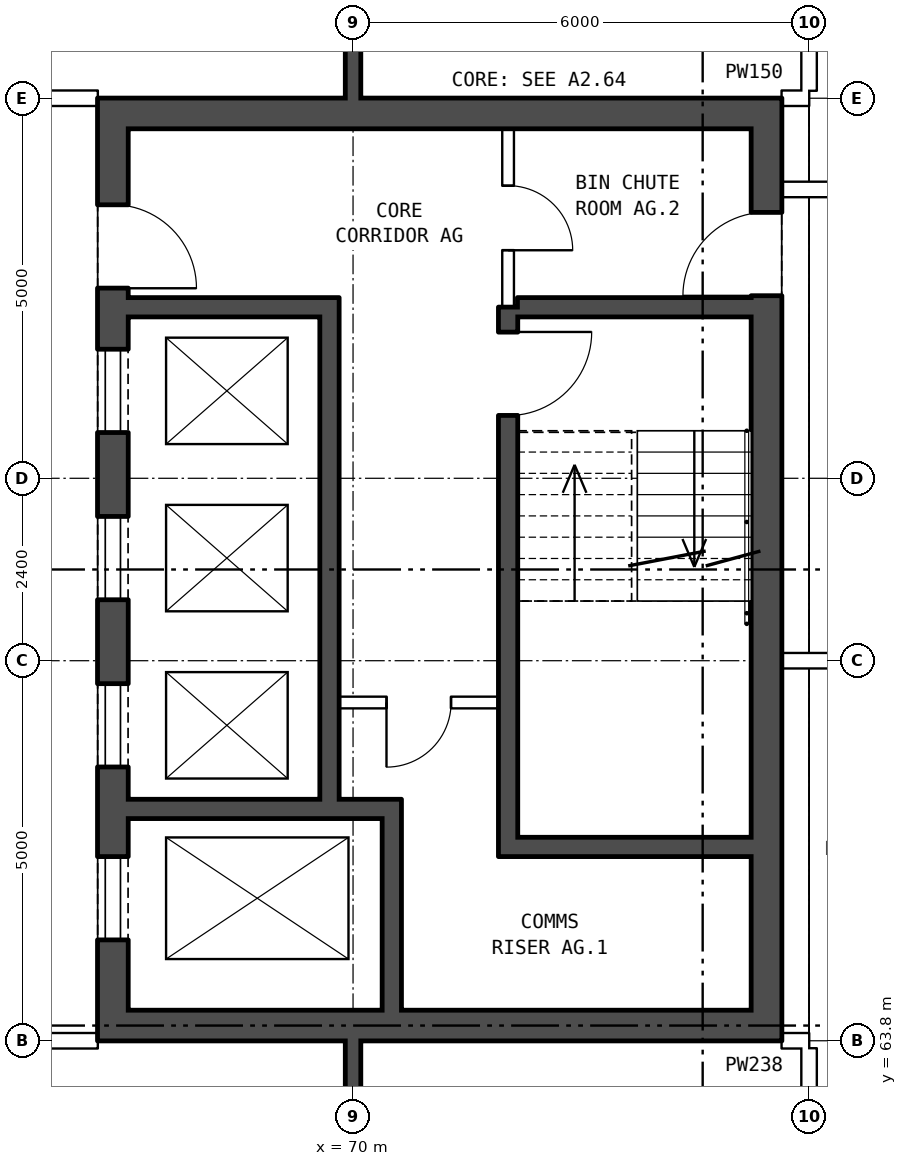
"""IFC4 building model, lengths in metres.
Left out: names, types, materials, properties, quantities, classifications, styles, units other than length and angle.
Written with IfcOpenShell. Run it as: python <this file> out.ifc"""

import sys

from ifc_helpers import new_model, si_unit, direction, frame, frame_2d, origin, place, context, subcontext, project, spatial, rectangle, extrude, element, fill, save


model = new_model("IFC4")
c1 = context("Model", 3, precision=1e-05, world=origin(), true_north=direction((0.0, 1.0)))
c2 = subcontext(c1, "Body", "Model", "MODEL_VIEW")
j1 = project(units=[si_unit("LENGTHUNIT", "METRE"), si_unit("PLANEANGLEUNIT", "RADIAN")], contexts=[c1])
p1 = place(None, origin())
s1 = spatial("IfcSite", under=j1, at=p1, CompositionType="ELEMENT")
p2 = place(p1, origin())
s2 = spatial("IfcBuilding", under=s1, at=p2, CompositionType="ELEMENT")
p3 = place(p2, frame((0.0, 0.0, 224.5)))
s3 = spatial("IfcBuildingStorey", under=s2, at=p3, CompositionType="ELEMENT", Elevation=224.5)
p4 = place(p3, frame((66.84, 63.8, 0.0), z_axis=(0.0, 0.0, 1.0), x_axis=(0.0, 1.0, 0.0)))
e1 = element("IfcWall", 1, at=p4, inside=s3, PredefinedType="SHEAR", context=c2, shape_type="SweptSolid", body=[
    extrude(rectangle(XDim=12.4, YDim=0.4, at=frame_2d((6.2, 0.0))), origin(), (0.0, 0.0, 1.0), 2.85),
])
p5 = place(p4, frame((1.325, 0.0, 0.0)))
e2 = element("IfcOpeningElement", 2, at=p5, cuts=e1, PredefinedType="OPENING", context=c2, shape_type="SweptSolid", body=[
    extrude(rectangle(XDim=1.1, YDim=2.1, at=frame_2d((0.55, 1.05))), frame((0.0, 0.21, 0.0), z_axis=(0.0, -1.0, 0.0), x_axis=(1.0, 0.0, 0.0)), (0.0, 0.0, 1.0), 0.42),
])
p6 = place(p4, frame((3.6, 0.0, 0.0)))
e3 = element("IfcOpeningElement", 3, at=p6, cuts=e1, PredefinedType="OPENING", context=c2, shape_type="SweptSolid", body=[
    extrude(rectangle(XDim=1.1, YDim=2.1, at=frame_2d((0.55, 1.05))), frame((0.0, 0.21, 0.0), z_axis=(0.0, -1.0, 0.0), x_axis=(1.0, 0.0, 0.0)), (0.0, 0.0, 1.0), 0.42),
])
p7 = place(p4, frame((5.8, 0.0, 0.0)))
e4 = element("IfcOpeningElement", 4, at=p7, cuts=e1, PredefinedType="OPENING", context=c2, shape_type="SweptSolid", body=[
    extrude(rectangle(XDim=1.1, YDim=2.1, at=frame_2d((0.55, 1.05))), frame((0.0, 0.21, 0.0), z_axis=(0.0, -1.0, 0.0), x_axis=(1.0, 0.0, 0.0)), (0.0, 0.0, 1.0), 0.42),
])
p8 = place(p4, frame((8.0, 0.0, 0.0)))
e5 = element("IfcOpeningElement", 5, at=p8, cuts=e1, PredefinedType="OPENING", context=c2, shape_type="SweptSolid", body=[
    extrude(rectangle(XDim=1.1, YDim=2.1, at=frame_2d((0.55, 1.05))), frame((0.0, 0.21, 0.0), z_axis=(0.0, -1.0, 0.0), x_axis=(1.0, 0.0, 0.0)), (0.0, 0.0, 1.0), 0.42),
])
p9 = place(p4, frame((9.9, 0.0, 0.0)))
e6 = element("IfcOpeningElement", 6, at=p9, cuts=e1, PredefinedType="OPENING", context=c2, shape_type="SweptSolid", body=[
    extrude(rectangle(XDim=1.1, YDim=2.1, at=frame_2d((0.55, 1.05))), frame((0.0, 0.21, 0.0), z_axis=(0.0, -1.0, 0.0), x_axis=(1.0, 0.0, 0.0)), (0.0, 0.0, 1.0), 0.42),
])
p10 = place(p3, frame((75.44, 63.8, 0.0), z_axis=(0.0, 0.0, 1.0), x_axis=(0.0, 1.0, 0.0)))
e7 = element("IfcWall", 7, at=p10, inside=s3, PredefinedType="SHEAR", context=c2, shape_type="SweptSolid", body=[
    extrude(rectangle(XDim=12.4, YDim=0.4, at=frame_2d((6.2, 0.0))), origin(), (0.0, 0.0, 1.0), 2.85),
])
p11 = place(p10, frame((9.8, 0.0, 0.0)))
e8 = element("IfcOpeningElement", 8, at=p11, cuts=e7, PredefinedType="OPENING", context=c2, shape_type="SweptSolid", body=[
    extrude(rectangle(XDim=1.1, YDim=2.1, at=frame_2d((0.55, 1.05))), frame((0.0, 0.21, 0.0), z_axis=(0.0, -1.0, 0.0), x_axis=(1.0, 0.0, 0.0)), (0.0, 0.0, 1.0), 0.42),
])
for number, where, z_axis, x_axis in (
    (9, (67.04, 64.0, 0.0), (0.0, 0.0, 1.0), (1.0, 0.0, 0.0)),
    (10, (67.04, 76.0, 0.0), (0.0, 0.0, 1.0), (1.0, 0.0, 0.0)),
):
    element("IfcWall", number, at=place(p3, frame(where, z_axis=z_axis, x_axis=x_axis)), inside=s3, PredefinedType="SHEAR", context=c2, shape_type="SweptSolid", body=[
        extrude(rectangle(XDim=8.2, YDim=0.4, at=frame_2d((4.1, 0.0))), origin(), (0.0, 0.0, 1.0), 2.85),
    ])
p12 = place(p3, frame((72.165, 66.35, 0.0), z_axis=(0.0, 0.0, 1.0), x_axis=(1.0, 0.0, 0.0)))
e11 = element("IfcWall", 11, at=p12, inside=s3, PredefinedType="SHEAR", context=c2, shape_type="SweptSolid", body=[
    extrude(rectangle(XDim=3.075, YDim=0.25, at=frame_2d((1.538, 0.0))), origin(), (0.0, 0.0, 1.0), 2.85),
])
p13 = place(p3, frame((67.04, 66.85, 0.0), z_axis=(0.0, 0.0, 1.0), x_axis=(1.0, 0.0, 0.0)))
e12 = element("IfcWall", 12, at=p13, inside=s3, PredefinedType="SHEAR", context=c2, shape_type="SweptSolid", body=[
    extrude(rectangle(XDim=3.595, YDim=0.25, at=frame_2d((1.797, 0.0))), origin(), (0.0, 0.0, 1.0), 2.85),
])
p14 = place(p3, frame((69.815, 68.25, 0.0), z_axis=(0.0, 0.0, 1.0), x_axis=(1.0, 0.0, 0.0)))
e13 = element("IfcWall", 13, at=p14, inside=s3, PredefinedType="PARTITIONING", context=c2, shape_type="SweptSolid", body=[
    extrude(rectangle(XDim=2.1, YDim=0.15, at=frame_2d((1.05, 0.0))), origin(), (0.0, 0.0, 1.0), 2.85),
])
p15 = place(p14, frame((0.625, 0.0, 0.0)))
e14 = element("IfcOpeningElement", 14, at=p15, cuts=e13, PredefinedType="OPENING", context=c2, shape_type="SweptSolid", body=[
    extrude(rectangle(XDim=0.85, YDim=2.1, at=frame_2d((0.425, 1.05))), frame((0.0, 0.085, 0.0), z_axis=(0.0, -1.0, 0.0), x_axis=(1.0, 0.0, 0.0)), (0.0, 0.0, 1.0), 0.17),
])
p16 = place(p3, frame((67.04, 73.45, 0.0), z_axis=(0.0, 0.0, 1.0), x_axis=(1.0, 0.0, 0.0)))
e15 = element("IfcWall", 15, at=p16, inside=s3, PredefinedType="SHEAR", context=c2, shape_type="SweptSolid", body=[
    extrude(rectangle(XDim=2.525, YDim=0.25, at=frame_2d((1.262, 0.0))), origin(), (0.0, 0.0, 1.0), 2.85),
])
p17 = place(p3, frame((72.165, 73.45, 0.0), z_axis=(0.0, 0.0, 1.0), x_axis=(1.0, 0.0, 0.0)))
e16 = element("IfcWall", 16, at=p17, inside=s3, PredefinedType="SHEAR", context=c2, shape_type="SweptSolid", body=[
    extrude(rectangle(XDim=3.075, YDim=0.25, at=frame_2d((1.538, 0.0))), origin(), (0.0, 0.0, 1.0), 2.85),
])
p18 = place(p3, frame((69.69, 66.975, 0.0), z_axis=(0.0, 0.0, 1.0), x_axis=(0.0, 1.0, 0.0)))
e17 = element("IfcWall", 17, at=p18, inside=s3, PredefinedType="SHEAR", context=c2, shape_type="SweptSolid", body=[
    extrude(rectangle(XDim=6.6, YDim=0.25, at=frame_2d((3.3, 0.0))), origin(), (0.0, 0.0, 1.0), 2.85),
])
p19 = place(p3, frame((70.51, 64.2, 0.0), z_axis=(0.0, 0.0, 1.0), x_axis=(0.0, 1.0, 0.0)))
e18 = element("IfcWall", 18, at=p19, inside=s3, PredefinedType="SHEAR", context=c2, shape_type="SweptSolid", body=[
    extrude(rectangle(XDim=2.525, YDim=0.25, at=frame_2d((1.263, 0.0))), origin(), (0.0, 0.0, 1.0), 2.85),
])
p20 = place(p3, frame((72.04, 66.225, 0.0), z_axis=(0.0, 0.0, 1.0), x_axis=(0.0, 1.0, 0.0)))
e19 = element("IfcWall", 19, at=p20, inside=s3, PredefinedType="SHEAR", context=c2, shape_type="SweptSolid", body=[
    extrude(rectangle(XDim=7.225, YDim=0.25, at=frame_2d((3.612, 0.0))), origin(), (0.0, 0.0, 1.0), 2.85),
])
p21 = place(p20, frame((5.8, 0.0, 0.0)))
e20 = element("IfcOpeningElement", 20, at=p21, cuts=e19, PredefinedType="OPENING", context=c2, shape_type="SweptSolid", body=[
    extrude(rectangle(XDim=1.1, YDim=2.1, at=frame_2d((0.55, 1.05))), frame((0.0, 0.135, 0.0), z_axis=(0.0, -1.0, 0.0), x_axis=(1.0, 0.0, 0.0)), (0.0, 0.0, 1.0), 0.27),
])
p22 = place(p3, frame((72.04, 73.45, 0.0), z_axis=(0.0, 0.0, 1.0), x_axis=(0.0, 1.0, 0.0)))
e21 = element("IfcWall", 21, at=p22, inside=s3, PredefinedType="PARTITIONING", context=c2, shape_type="SweptSolid", body=[
    extrude(rectangle(XDim=2.35, YDim=0.15, at=frame_2d((1.175, 0.0))), origin(), (0.0, 0.0, 1.0), 2.85),
])
p23 = place(p22, frame((0.75, 0.0, 0.0)))
e22 = element("IfcOpeningElement", 22, at=p23, cuts=e21, PredefinedType="OPENING", context=c2, shape_type="SweptSolid", body=[
    extrude(rectangle(XDim=0.85, YDim=2.1, at=frame_2d((0.425, 1.05))), frame((0.0, 0.085, 0.0), z_axis=(0.0, -1.0, 0.0), x_axis=(1.0, 0.0, 0.0)), (0.0, 0.0, 1.0), 0.17),
])
p24 = place(p3, frame((63.64, 63.8, 0.0), z_axis=(0.0, 0.0, 1.0), x_axis=(1.0, 0.0, 0.0)))
e23 = element("IfcWall", 23, at=p24, inside=s3, PredefinedType="PARTITIONING", context=c2, shape_type="SweptSolid", body=[
    extrude(rectangle(XDim=3.0, YDim=0.2, at=frame_2d((1.5, 0.0))), origin(), (0.0, 0.0, 1.0), 2.85),
])
p25 = place(p24, frame((1.18, 0.0, 0.0)))
e24 = element("IfcOpeningElement", 24, at=p25, cuts=e23, PredefinedType="OPENING", context=c2, shape_type="SweptSolid", body=[
    extrude(rectangle(XDim=1.0, YDim=2.1, at=frame_2d((0.5, 1.05))), frame((0.0, 0.11, 0.0), z_axis=(0.0, -1.0, 0.0), x_axis=(1.0, 0.0, 0.0)), (0.0, 0.0, 1.0), 0.22),
])
p26 = place(p3, frame((75.64, 63.8, 0.0), z_axis=(0.0, 0.0, 1.0), x_axis=(1.0, 0.0, 0.0)))
e25 = element("IfcWall", 25, at=p26, inside=s3, PredefinedType="PARTITIONING", context=c2, shape_type="SweptSolid", body=[
    extrude(rectangle(XDim=0.36, YDim=0.2, at=frame_2d((0.18, 0.0))), origin(), (0.0, 0.0, 1.0), 2.85),
])
p27 = place(p3, frame((75.64, 68.8, 0.0), z_axis=(0.0, 0.0, 1.0), x_axis=(1.0, 0.0, 0.0)))
e26 = element("IfcWall", 26, at=p27, inside=s3, PredefinedType="PARTITIONING", context=c2, shape_type="SweptSolid", body=[
    extrude(rectangle(XDim=55.72, YDim=0.2, at=frame_2d((27.86, 0.0))), origin(), (0.0, 0.0, 1.0), 2.85),
])
p28 = place(p27, frame((1.399, 0.0, 0.0)))
e27 = element("IfcOpeningElement", 27, at=p28, cuts=e26, PredefinedType="OPENING", context=c2, shape_type="SweptSolid", body=[
    extrude(rectangle(XDim=1.0, YDim=2.1, at=frame_2d((0.5, 1.05))), frame((0.0, 0.11, 0.0), z_axis=(0.0, -1.0, 0.0), x_axis=(1.0, 0.0, 0.0)), (0.0, 0.0, 1.0), 0.22),
])
p29 = place(p27, frame((12.241, 0.0, 0.0)))
e28 = element("IfcOpeningElement", 28, at=p29, cuts=e26, PredefinedType="OPENING", context=c2, shape_type="SweptSolid", body=[
    extrude(rectangle(XDim=1.0, YDim=2.1, at=frame_2d((0.5, 1.05))), frame((0.0, 0.11, 0.0), z_axis=(0.0, -1.0, 0.0), x_axis=(1.0, 0.0, 0.0)), (0.0, 0.0, 1.0), 0.22),
])
p30 = place(p27, frame((22.553, 0.0, 0.0)))
e29 = element("IfcOpeningElement", 29, at=p30, cuts=e26, PredefinedType="OPENING", context=c2, shape_type="SweptSolid", body=[
    extrude(rectangle(XDim=1.0, YDim=2.1, at=frame_2d((0.5, 1.05))), frame((0.0, 0.11, 0.0), z_axis=(0.0, -1.0, 0.0), x_axis=(1.0, 0.0, 0.0)), (0.0, 0.0, 1.0), 0.22),
])
p31 = place(p27, frame((32.866, 0.0, 0.0)))
e30 = element("IfcOpeningElement", 30, at=p31, cuts=e26, PredefinedType="OPENING", context=c2, shape_type="SweptSolid", body=[
    extrude(rectangle(XDim=1.0, YDim=2.1, at=frame_2d((0.5, 1.05))), frame((0.0, 0.11, 0.0), z_axis=(0.0, -1.0, 0.0), x_axis=(1.0, 0.0, 0.0)), (0.0, 0.0, 1.0), 0.22),
])
p32 = place(p27, frame((36.303, 0.0, 0.0)))
e31 = element("IfcOpeningElement", 31, at=p32, cuts=e26, PredefinedType="OPENING", context=c2, shape_type="SweptSolid", body=[
    extrude(rectangle(XDim=1.0, YDim=2.1, at=frame_2d((0.5, 1.05))), frame((0.0, 0.11, 0.0), z_axis=(0.0, -1.0, 0.0), x_axis=(1.0, 0.0, 0.0)), (0.0, 0.0, 1.0), 0.22),
])
p33 = place(p27, frame((46.616, 0.0, 0.0)))
e32 = element("IfcOpeningElement", 32, at=p33, cuts=e26, PredefinedType="OPENING", context=c2, shape_type="SweptSolid", body=[
    extrude(rectangle(XDim=1.0, YDim=2.1, at=frame_2d((0.5, 1.05))), frame((0.0, 0.11, 0.0), z_axis=(0.0, -1.0, 0.0), x_axis=(1.0, 0.0, 0.0)), (0.0, 0.0, 1.0), 0.22),
])
p34 = place(p27, frame((50.053, 0.0, 0.0)))
e33 = element("IfcOpeningElement", 33, at=p34, cuts=e26, PredefinedType="OPENING", context=c2, shape_type="SweptSolid", body=[
    extrude(rectangle(XDim=1.0, YDim=2.1, at=frame_2d((0.5, 1.05))), frame((0.0, 0.11, 0.0), z_axis=(0.0, -1.0, 0.0), x_axis=(1.0, 0.0, 0.0)), (0.0, 0.0, 1.0), 0.22),
])
p35 = place(p3, frame((75.64, 75.0, 0.0), z_axis=(0.0, 0.0, 1.0), x_axis=(1.0, 0.0, 0.0)))
e34 = element("IfcWall", 34, at=p35, inside=s3, PredefinedType="PARTITIONING", context=c2, shape_type="SweptSolid", body=[
    extrude(rectangle(XDim=7.585, YDim=0.2, at=frame_2d((3.792, 0.0))), origin(), (0.0, 0.0, 1.0), 2.85),
])
p36 = place(p35, frame((3.343, 0.0, 0.0)))
e35 = element("IfcOpeningElement", 35, at=p36, cuts=e34, PredefinedType="OPENING", context=c2, shape_type="SweptSolid", body=[
    extrude(rectangle(XDim=0.9, YDim=2.1, at=frame_2d((0.45, 1.05))), frame((0.0, 0.11, 0.0), z_axis=(0.0, -1.0, 0.0), x_axis=(1.0, 0.0, 0.0)), (0.0, 0.0, 1.0), 0.22),
])
p37 = place(p3, frame((63.64, 76.2, 0.0), z_axis=(0.0, 0.0, 1.0), x_axis=(1.0, 0.0, 0.0)))
e36 = element("IfcWall", 36, at=p37, inside=s3, PredefinedType="PARTITIONING", context=c2, shape_type="SweptSolid", body=[
    extrude(rectangle(XDim=3.0, YDim=0.2, at=frame_2d((1.5, 0.0))), origin(), (0.0, 0.0, 1.0), 2.85),
])
p38 = place(p37, frame((1.18, 0.0, 0.0)))
e37 = element("IfcOpeningElement", 37, at=p38, cuts=e36, PredefinedType="OPENING", context=c2, shape_type="SweptSolid", body=[
    extrude(rectangle(XDim=1.0, YDim=2.1, at=frame_2d((0.5, 1.05))), frame((0.0, 0.11, 0.0), z_axis=(0.0, -1.0, 0.0), x_axis=(1.0, 0.0, 0.0)), (0.0, 0.0, 1.0), 0.22),
])
p39 = place(p3, frame((75.64, 76.2, 0.0), z_axis=(0.0, 0.0, 1.0), x_axis=(1.0, 0.0, 0.0)))
e38 = element("IfcWall", 38, at=p39, inside=s3, PredefinedType="PARTITIONING", context=c2, shape_type="SweptSolid", body=[
    extrude(rectangle(XDim=0.36, YDim=0.2, at=frame_2d((0.18, 0.0))), origin(), (0.0, 0.0, 1.0), 2.85),
])
p40 = place(p3, frame((70.0, 54.36, 0.0), z_axis=(0.0, 0.0, 1.0), x_axis=(0.0, 1.0, 0.0)))
e39 = element("IfcWall", 39, at=p40, inside=s3, PredefinedType="SOLIDWALL", context=c2, shape_type="SweptSolid", body=[
    extrude(rectangle(XDim=9.44, YDim=0.2, at=frame_2d((4.72, 0.0))), origin(), (0.0, 0.0, 1.0), 2.85),
])
p41 = place(p40, frame((2.32, 0.0, 0.0)))
e40 = element("IfcOpeningElement", 40, at=p41, cuts=e39, PredefinedType="OPENING", context=c2, shape_type="SweptSolid", body=[
    extrude(rectangle(XDim=0.9, YDim=2.1, at=frame_2d((0.45, 1.05))), frame((0.0, 0.11, 0.0), z_axis=(0.0, -1.0, 0.0), x_axis=(1.0, 0.0, 0.0)), (0.0, 0.0, 1.0), 0.22),
])
p42 = place(p40, frame((7.39, 0.0, 0.0)))
e41 = element("IfcOpeningElement", 41, at=p42, cuts=e39, PredefinedType="OPENING", context=c2, shape_type="SweptSolid", body=[
    extrude(rectangle(XDim=0.8, YDim=2.1, at=frame_2d((0.4, 1.05))), frame((0.0, 0.11, 0.0), z_axis=(0.0, -1.0, 0.0), x_axis=(1.0, 0.0, 0.0)), (0.0, 0.0, 1.0), 0.22),
])
p43 = place(p3, frame((70.0, 76.2, 0.0), z_axis=(0.0, 0.0, 1.0), x_axis=(0.0, 1.0, 0.0)))
e42 = element("IfcWall", 42, at=p43, inside=s3, PredefinedType="SOLIDWALL", context=c2, shape_type="SweptSolid", body=[
    extrude(rectangle(XDim=9.44, YDim=0.2, at=frame_2d((4.72, 0.0))), origin(), (0.0, 0.0, 1.0), 2.85),
])
p44 = place(p43, frame((5.92, 0.0, 0.0)))
e43 = element("IfcOpeningElement", 43, at=p44, cuts=e42, PredefinedType="OPENING", context=c2, shape_type="SweptSolid", body=[
    extrude(rectangle(XDim=0.9, YDim=2.1, at=frame_2d((0.45, 1.05))), frame((0.0, 0.11, 0.0), z_axis=(0.0, -1.0, 0.0), x_axis=(1.0, 0.0, 0.0)), (0.0, 0.0, 1.0), 0.22),
])
p45 = place(p43, frame((1.25, 0.0, 0.0)))
e44 = element("IfcOpeningElement", 44, at=p45, cuts=e42, PredefinedType="OPENING", context=c2, shape_type="SweptSolid", body=[
    extrude(rectangle(XDim=0.8, YDim=2.1, at=frame_2d((0.4, 1.05))), frame((0.0, 0.11, 0.0), z_axis=(0.0, -1.0, 0.0), x_axis=(1.0, 0.0, 0.0)), (0.0, 0.0, 1.0), 0.22),
])
for number, where, z_axis, x_axis in (
    (45, (76.0, 54.36, 0.0), (0.0, 0.0, 1.0), (0.0, 1.0, 0.0)),
    (46, (76.0, 76.3, 0.0), (0.0, 0.0, 1.0), (0.0, 1.0, 0.0)),
):
    element("IfcWall", number, at=place(p3, frame(where, z_axis=z_axis, x_axis=x_axis)), inside=s3, PredefinedType="PARTITIONING", context=c2, shape_type="SweptSolid", body=[
        extrude(rectangle(XDim=9.34, YDim=0.2, at=frame_2d((4.67, 0.0))), origin(), (0.0, 0.0, 1.0), 2.85),
    ])
p46 = place(p5, origin())
e47 = element("IfcDoor", 47, at=p46, inside=s3, OperationType="DOUBLE_DOOR_SLIDING", PredefinedType="DOOR", context=c2, shape_type="SweptSolid", body=[
    extrude(rectangle(XDim=1.1, YDim=2.1, at=frame_2d((0.55, 1.05))), frame((0.0, -0.135, 0.0), z_axis=(0.0, -1.0, 0.0), x_axis=(1.0, 0.0, 0.0)), (0.0, 0.0, 1.0), 0.05),
])
fill(e2, e47)
p47 = place(p6, origin())
e48 = element("IfcDoor", 48, at=p47, inside=s3, OperationType="DOUBLE_DOOR_SLIDING", PredefinedType="DOOR", context=c2, shape_type="SweptSolid", body=[
    extrude(rectangle(XDim=1.1, YDim=2.1, at=frame_2d((0.55, 1.05))), frame((0.0, -0.135, 0.0), z_axis=(0.0, -1.0, 0.0), x_axis=(1.0, 0.0, 0.0)), (0.0, 0.0, 1.0), 0.05),
])
fill(e3, e48)
p48 = place(p7, origin())
e49 = element("IfcDoor", 49, at=p48, inside=s3, OperationType="DOUBLE_DOOR_SLIDING", PredefinedType="DOOR", context=c2, shape_type="SweptSolid", body=[
    extrude(rectangle(XDim=1.1, YDim=2.1, at=frame_2d((0.55, 1.05))), frame((0.0, -0.135, 0.0), z_axis=(0.0, -1.0, 0.0), x_axis=(1.0, 0.0, 0.0)), (0.0, 0.0, 1.0), 0.05),
])
fill(e4, e49)
p49 = place(p8, origin())
e50 = element("IfcDoor", 50, at=p49, inside=s3, OperationType="DOUBLE_DOOR_SLIDING", PredefinedType="DOOR", context=c2, shape_type="SweptSolid", body=[
    extrude(rectangle(XDim=1.1, YDim=2.1, at=frame_2d((0.55, 1.05))), frame((0.0, -0.135, 0.0), z_axis=(0.0, -1.0, 0.0), x_axis=(1.0, 0.0, 0.0)), (0.0, 0.0, 1.0), 0.05),
])
fill(e5, e50)
p50 = place(p9, frame((1.1, 0.0, 0.0), z_axis=(0.0, 0.0, 1.0), x_axis=(-1.0, 0.0, 0.0)))
e51 = element("IfcDoor", 51, at=p50, inside=s3, OperationType="SINGLE_SWING_RIGHT", PredefinedType="DOOR", context=c2, shape_type="SweptSolid", body=[
    extrude(rectangle(XDim=1.1, YDim=2.1, at=frame_2d((0.55, 1.05))), frame((0.0, 0.185, 0.0), z_axis=(0.0, -1.0, 0.0), x_axis=(1.0, 0.0, 0.0)), (0.0, 0.0, 1.0), 0.05),
])
fill(e6, e51)
p51 = place(p21, frame((1.1, 0.0, 0.0), z_axis=(0.0, 0.0, 1.0), x_axis=(-1.0, 0.0, 0.0)))
e52 = element("IfcDoor", 52, at=p51, inside=s3, OperationType="SINGLE_SWING_LEFT", PredefinedType="DOOR", context=c2, shape_type="SweptSolid", body=[
    extrude(rectangle(XDim=1.1, YDim=2.1, at=frame_2d((0.55, 1.05))), frame((0.0, 0.025, 0.0), z_axis=(0.0, -1.0, 0.0), x_axis=(1.0, 0.0, 0.0)), (0.0, 0.0, 1.0), 0.05),
])
fill(e20, e52)
p52 = place(p15, frame((0.85, 0.0, 0.0), z_axis=(0.0, 0.0, 1.0), x_axis=(-1.0, 0.0, 0.0)))
e53 = element("IfcDoor", 53, at=p52, inside=s3, OperationType="SINGLE_SWING_RIGHT", PredefinedType="DOOR", context=c2, shape_type="SweptSolid", body=[
    extrude(rectangle(XDim=0.85, YDim=2.1, at=frame_2d((0.425, 1.05))), frame((0.0, 0.025, 0.0), z_axis=(0.0, -1.0, 0.0), x_axis=(1.0, 0.0, 0.0)), (0.0, 0.0, 1.0), 0.05),
])
fill(e14, e53)
p53 = place(p23, frame((0.85, 0.0, 0.0), z_axis=(0.0, 0.0, 1.0), x_axis=(-1.0, 0.0, 0.0)))
e54 = element("IfcDoor", 54, at=p53, inside=s3, OperationType="SINGLE_SWING_RIGHT", PredefinedType="DOOR", context=c2, shape_type="SweptSolid", body=[
    extrude(rectangle(XDim=0.85, YDim=2.1, at=frame_2d((0.425, 1.05))), frame((0.0, 0.025, 0.0), z_axis=(0.0, -1.0, 0.0), x_axis=(1.0, 0.0, 0.0)), (0.0, 0.0, 1.0), 0.05),
])
fill(e22, e54)
p54 = place(p11, origin())
e55 = element("IfcDoor", 55, at=p54, inside=s3, OperationType="SINGLE_SWING_LEFT", PredefinedType="DOOR", context=c2, shape_type="SweptSolid", body=[
    extrude(rectangle(XDim=1.1, YDim=2.1, at=frame_2d((0.55, 1.05))), frame((0.0, 0.185, 0.0), z_axis=(0.0, -1.0, 0.0), x_axis=(1.0, 0.0, 0.0)), (0.0, 0.0, 1.0), 0.05),
])
fill(e8, e55)
save(model, sys.argv[1])
